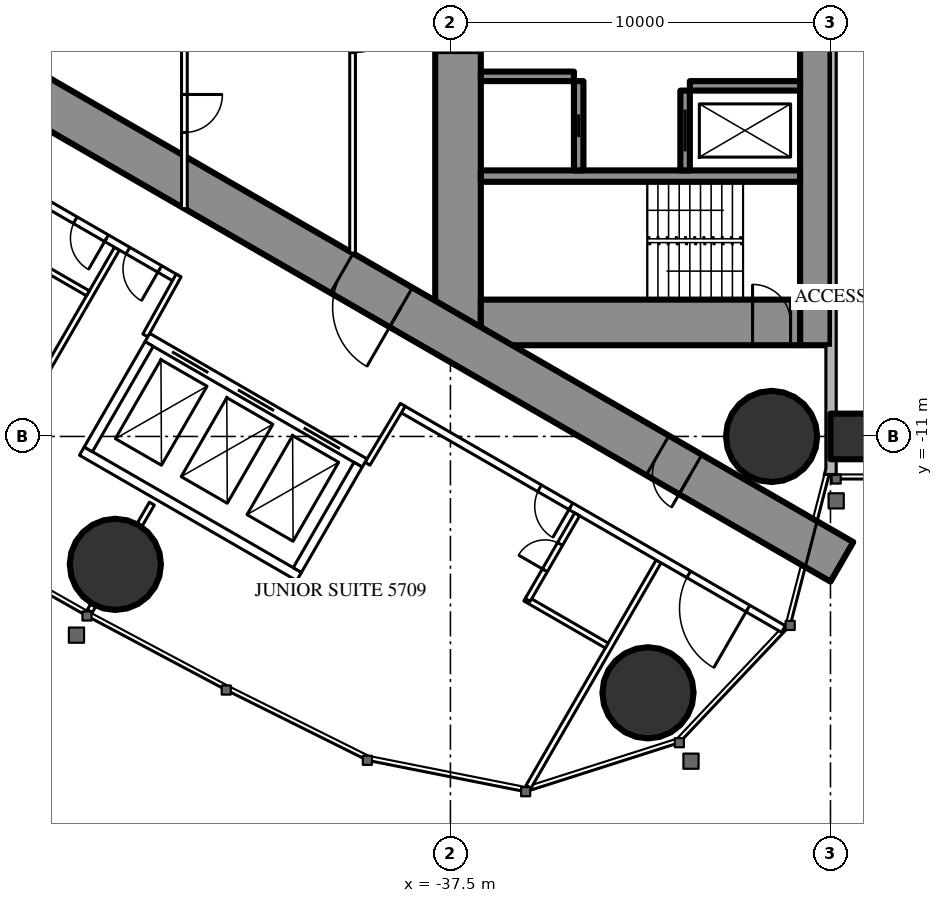
"""IFC4 building model, lengths in metres.
Left out: names, types, materials, properties, quantities, classifications, styles, units other than length and angle.
Written with IfcOpenShell. Run it as: python <this file> out.ifc"""

import sys

from ifc_helpers import new_model, si_unit, direction, frame, frame_2d, origin, origin_2d, place, context, subcontext, project, spatial, rectangle, hollow_rectangle, circle, extrude, element, fill, save


model = new_model("IFC4")
c1 = context("Model", 3, precision=1e-05, world=origin(), true_north=direction((0.0, 1.0)))
c2 = subcontext(c1, "Body", "Model", "MODEL_VIEW")
j1 = project(units=[si_unit("LENGTHUNIT", "METRE"), si_unit("PLANEANGLEUNIT", "RADIAN")], contexts=[c1])
p1 = place(None, origin())
s1 = spatial("IfcSite", under=j1, at=p1, CompositionType="ELEMENT")
p2 = place(p1, origin())
s2 = spatial("IfcBuilding", under=s1, at=p2, CompositionType="ELEMENT")
p3 = place(p2, frame((0.0, 0.0, 215.3)))
s3 = spatial("IfcBuildingStorey", under=s2, at=p3, CompositionType="ELEMENT", Elevation=215.3)
for number, where, z_axis, x_axis in (
    (1, (-32.301, -17.745, 0.0), (0.0, 0.0, 1.0), (1.0, 0.0, 0.0)),
    (2, (-29.05, -11.0, 0.0), (0.0, 0.0, 1.0), (1.0, 0.0, 0.0)),
    (3, (-46.317, -14.365, 0.0), (0.0, 0.0, 1.0), (1.0, 0.0, 0.0)),
):
    element("IfcColumn", number, at=place(p3, frame(where, z_axis=z_axis, x_axis=x_axis)), inside=s3, PredefinedType="COLUMN", context=c2, shape_type="SweptSolid", body=[
        extrude(circle(Radius=1.2, at=origin_2d()), origin(), (0.0, 0.0, 1.0), 3.6),
    ])
p4 = place(p3, frame((-27.9, 8.6, 0.0), z_axis=(0.0, 0.0, 1.0), x_axis=(0.0, -1.0, 0.0)))
e4 = element("IfcWall", 4, at=p4, inside=s3, PredefinedType="SHEAR", context=c2, shape_type="SweptSolid", body=[
    extrude(rectangle(XDim=17.2, YDim=0.8, at=frame_2d((8.6, 0.0))), origin(), (0.0, 0.0, 1.0), 3.6),
])
p5 = place(p4, frame((6.95, 0.0, 0.0)))
e5 = element("IfcOpeningElement", 5, at=p5, cuts=e4, PredefinedType="OPENING", context=c2, shape_type="SweptSolid", body=[
    extrude(rectangle(XDim=0.9, YDim=2.2, at=frame_2d((0.45, 1.1))), frame((0.0, 0.41, 0.0), z_axis=(0.0, -1.0, 0.0), x_axis=(1.0, 0.0, 0.0)), (0.0, 0.0, 1.0), 0.82),
])
p6 = place(p3, frame((-37.3, 8.6, 0.0), z_axis=(0.0, 0.0, 1.0), x_axis=(0.0, -1.0, 0.0)))
e6 = element("IfcWall", 6, at=p6, inside=s3, PredefinedType="SHEAR", context=c2, shape_type="SweptSolid", body=[
    extrude(rectangle(XDim=17.2, YDim=1.2, at=frame_2d((8.6, 0.0))), origin(), (0.0, 0.0, 1.0), 3.6),
])
p7 = place(p6, frame((7.7, 0.0, 0.0)))
e7 = element("IfcOpeningElement", 7, at=p7, cuts=e6, PredefinedType="OPENING", context=c2, shape_type="SweptSolid", body=[
    extrude(rectangle(XDim=1.8, YDim=2.2, at=frame_2d((0.9, 1.1))), frame((0.0, 0.61, 0.0), z_axis=(0.0, -1.0, 0.0), x_axis=(1.0, 0.0, 0.0)), (0.0, 0.0, 1.0), 1.22),
])
p8 = place(p3, frame((-28.3, -8.0, 0.0), z_axis=(0.0, 0.0, 1.0), x_axis=(-1.0, 0.0, 0.0)))
e8 = element("IfcWall", 8, at=p8, inside=s3, PredefinedType="SHEAR", context=c2, shape_type="SweptSolid", body=[
    extrude(rectangle(XDim=8.4, YDim=1.2, at=frame_2d((4.2, 0.0))), origin(), (0.0, 0.0, 1.0), 3.6),
])
p9 = place(p8, frame((0.25, 0.0, 0.0)))
e9 = element("IfcOpeningElement", 9, at=p9, cuts=e8, PredefinedType="OPENING", context=c2, shape_type="SweptSolid", body=[
    extrude(rectangle(XDim=1.0, YDim=2.2, at=frame_2d((0.5, 1.1))), frame((0.0, 0.61, 0.0), z_axis=(0.0, -1.0, 0.0), x_axis=(1.0, 0.0, 0.0)), (0.0, 0.0, 1.0), 1.22),
])
p10 = place(p3, frame((-28.3, -4.15, 0.0), z_axis=(0.0, 0.0, 1.0), x_axis=(-1.0, 0.0, 0.0)))
e10 = element("IfcWall", 10, at=p10, inside=s3, PredefinedType="SHEAR", context=c2, shape_type="SweptSolid", body=[
    extrude(rectangle(XDim=8.4, YDim=0.3, at=frame_2d((4.2, 0.0))), origin(), (0.0, 0.0, 1.0), 3.6),
])
p11 = place(p3, frame((-31.325, -1.9, 0.0), z_axis=(0.0, 0.0, 1.0), x_axis=(0.0, -1.0, 0.0)))
e11 = element("IfcWall", 11, at=p11, inside=s3, PredefinedType="SHEAR", context=c2, shape_type="SweptSolid", body=[
    extrude(rectangle(XDim=2.1, YDim=0.25, at=frame_2d((1.05, 0.0))), origin(), (0.0, 0.0, 1.0), 3.6),
])
p12 = place(p11, frame((0.5, 0.0, 0.0)))
e12 = element("IfcOpeningElement", 12, at=p12, cuts=e11, PredefinedType="OPENING", context=c2, shape_type="SweptSolid", body=[
    extrude(rectangle(XDim=1.1, YDim=2.2, at=frame_2d((0.55, 1.1))), frame((0.0, 0.135, 0.0), z_axis=(0.0, -1.0, 0.0), x_axis=(1.0, 0.0, 0.0)), (0.0, 0.0, 1.0), 0.27),
])
p13 = place(p3, frame((-34.125, -1.65, 0.0), z_axis=(0.0, 0.0, 1.0), x_axis=(0.0, -1.0, 0.0)))
e13 = element("IfcWall", 13, at=p13, inside=s3, PredefinedType="SHEAR", context=c2, shape_type="SweptSolid", body=[
    extrude(rectangle(XDim=2.35, YDim=0.25, at=frame_2d((1.175, 0.0))), origin(), (0.0, 0.0, 1.0), 3.6),
])
p14 = place(p13, frame((0.875, 0.0, 0.0)))
e14 = element("IfcOpeningElement", 14, at=p14, cuts=e13, PredefinedType="OPENING", context=c2, shape_type="SweptSolid", body=[
    extrude(rectangle(XDim=0.6, YDim=2.0, at=frame_2d((0.3, 1.0))), frame((0.0, 0.135, 0.0), z_axis=(0.0, -1.0, 0.0), x_axis=(1.0, 0.0, 0.0)), (0.0, 0.0, 1.0), 0.27),
])
p15 = place(p3, frame((-28.3, -1.775, 0.0), z_axis=(0.0, 0.0, 1.0), x_axis=(-1.0, 0.0, 0.0)))
e15 = element("IfcWall", 15, at=p15, inside=s3, PredefinedType="SHEAR", context=c2, shape_type="SweptSolid", body=[
    extrude(rectangle(XDim=2.9, YDim=0.25, at=frame_2d((1.45, 0.0))), origin(), (0.0, 0.0, 1.0), 3.6),
])
p16 = place(p3, frame((-34.25, -1.525, 0.0), z_axis=(0.0, 0.0, 1.0), x_axis=(-1.0, 0.0, 0.0)))
e16 = element("IfcWall", 16, at=p16, inside=s3, PredefinedType="SHEAR", context=c2, shape_type="SweptSolid", body=[
    extrude(rectangle(XDim=2.45, YDim=0.25, at=frame_2d((1.225, 0.0))), origin(), (0.0, 0.0, 1.0), 3.6),
])
p17 = place(p3, frame((-27.2, -14.3, 0.0), z_axis=(0.0, 0.0, 1.0), x_axis=(-0.866024021859, 0.500002393557, 0.0)))
e17 = element("IfcWall", 17, at=p17, inside=s3, PredefinedType="SHEAR", context=c2, shape_type="SweptSolid", body=[
    extrude(rectangle(XDim=27.907, YDim=1.2, at=frame_2d((13.954, 0.0))), origin(), (0.0, 0.0, 1.0), 3.6),
])
p18 = place(p17, frame((4.6, 0.0, 0.0)))
e18 = element("IfcOpeningElement", 18, at=p18, cuts=e17, PredefinedType="OPENING", context=c2, shape_type="SweptSolid", body=[
    extrude(rectangle(XDim=1.0, YDim=2.2, at=frame_2d((0.5, 1.1))), frame((0.0, 0.61, 0.0), z_axis=(0.0, -1.0, 0.0), x_axis=(1.0, 0.0, 0.0)), (0.0, 0.0, 1.0), 1.22),
])
p19 = place(p17, frame((13.395, 0.0, 0.0)))
e19 = element("IfcOpeningElement", 19, at=p19, cuts=e17, PredefinedType="OPENING", context=c2, shape_type="SweptSolid", body=[
    extrude(rectangle(XDim=1.8, YDim=2.2, at=frame_2d((0.9, 1.1))), frame((0.0, 0.61, 0.0), z_axis=(0.0, -1.0, 0.0), x_axis=(1.0, 0.0, 0.0)), (0.0, 0.0, 1.0), 1.22),
])
p20 = place(p3, frame((-26.9, -11.0, 0.0), z_axis=(0.0, 0.0, 1.0), x_axis=(1.0, 0.0, 0.0)))
e20 = element("IfcColumn", 20, at=p20, inside=s3, PredefinedType="COLUMN", context=c2, shape_type="SweptSolid", body=[
    extrude(hollow_rectangle(XDim=1.2, YDim=1.2, WallThickness=0.12, at=origin_2d()), origin(), (0.0, 0.0, 1.0), 3.6),
])
p21 = place(p3, frame((-32.022, -14.287, 0.0), z_axis=(0.0, 0.0, 1.0), x_axis=(-0.50000019414, -0.866025291697, 0.0)))
e21 = element("IfcWall", 21, at=p21, inside=s3, PredefinedType="PARTITIONING", context=c2, shape_type="SweptSolid", body=[
    extrude(rectangle(XDim=6.848, YDim=0.15, at=frame_2d((3.424, 0.0))), origin(), (0.0, 0.0, 1.0), 3.35),
])
p22 = place(p3, frame((-46.898, -15.439, 0.0), z_axis=(0.0, 0.0, 1.0), x_axis=(-0.500232303069, -0.865891241997, 0.0)))
e22 = element("IfcWall", 22, at=p22, inside=s3, PredefinedType="PARTITIONING", context=c2, shape_type="SweptSolid", body=[
    extrude(rectangle(XDim=0.18, YDim=0.15, at=frame_2d((0.09, 0.0))), origin(), (0.0, 0.0, 1.0), 2.45),
])
p23 = place(p3, frame((-46.274, -6.059, 0.0), z_axis=(0.0, 0.0, 1.0), x_axis=(-0.500020471368, -0.866013584312, 0.0)))
e23 = element("IfcWall", 23, at=p23, inside=s3, PredefinedType="PARTITIONING", context=c2, shape_type="SweptSolid", body=[
    extrude(rectangle(XDim=6.028, YDim=0.15, at=frame_2d((3.014, 0.0))), origin(), (0.0, 0.0, 1.0), 2.45),
])
p24 = place(p3, frame((-45.356, -12.767, 0.0), z_axis=(0.0, 0.0, 1.0), x_axis=(-0.499886366516, -0.866091000168, 0.0)))
e24 = element("IfcWall", 24, at=p24, inside=s3, PredefinedType="PARTITIONING", context=c2, shape_type="SweptSolid", body=[
    extrude(rectangle(XDim=0.645, YDim=0.15, at=frame_2d((0.322, 0.0))), origin(), (0.0, 0.0, 1.0), 3.35),
])
p25 = place(p3, frame((-28.737, -16.068, 0.0), z_axis=(0.0, 0.0, 1.0), x_axis=(-0.866029399323, 0.49999307946, 0.0)))
e25 = element("IfcWall", 25, at=p25, inside=s3, PredefinedType="PARTITIONING", context=c2, shape_type="SweptSolid", body=[
    extrude(rectangle(XDim=11.61, YDim=0.2, at=frame_2d((5.805, 0.0))), origin(), (0.0, 0.0, 1.0), 3.35),
])
p26 = place(p25, frame((1.08, 0.0, 0.0)))
e26 = element("IfcOpeningElement", 26, at=p26, cuts=e25, PredefinedType="OPENING", context=c2, shape_type="SweptSolid", body=[
    extrude(rectangle(XDim=1.8, YDim=2.03, at=frame_2d((0.9, 1.015))), frame((0.0, 0.11, 0.0), z_axis=(0.0, -1.0, 0.0), x_axis=(1.0, 0.0, 0.0)), (0.0, 0.0, 1.0), 0.22),
])
p27 = place(p25, frame((6.46, 0.0, 0.0)))
e27 = element("IfcOpeningElement", 27, at=p27, cuts=e25, PredefinedType="OPENING", context=c2, shape_type="SweptSolid", body=[
    extrude(rectangle(XDim=0.95, YDim=2.2, at=frame_2d((0.475, 1.1))), frame((0.0, 0.11, 0.0), z_axis=(0.0, -1.0, 0.0), x_axis=(1.0, 0.0, 0.0)), (0.0, 0.0, 1.0), 0.22),
])
p28 = place(p3, frame((-44.715, -6.844, 0.0), z_axis=(0.0, 0.0, 1.0), x_axis=(-0.866025261224, 0.500000246922, 0.0)))
e28 = element("IfcWall", 28, at=p28, inside=s3, PredefinedType="PARTITIONING", context=c2, shape_type="SweptSolid", body=[
    extrude(rectangle(XDim=13.567, YDim=0.2, at=frame_2d((6.783, 0.0))), origin(), (0.0, 0.0, 1.0), 3.35),
])
p29 = place(p28, frame((9.667, 0.0, 0.0)))
e29 = element("IfcOpeningElement", 29, at=p29, cuts=e28, PredefinedType="OPENING", context=c2, shape_type="SweptSolid", body=[
    extrude(rectangle(XDim=0.95, YDim=2.2, at=frame_2d((0.475, 1.1))), frame((0.0, 0.11, 0.0), z_axis=(0.0, -1.0, 0.0), x_axis=(1.0, 0.0, 0.0)), (0.0, 0.0, 1.0), 0.22),
])
p30 = place(p28, frame((2.117, 0.0, 0.0)))
e30 = element("IfcOpeningElement", 30, at=p30, cuts=e28, PredefinedType="OPENING", context=c2, shape_type="SweptSolid", body=[
    extrude(rectangle(XDim=0.95, YDim=2.2, at=frame_2d((0.475, 1.1))), frame((0.0, 0.11, 0.0), z_axis=(0.0, -1.0, 0.0), x_axis=(1.0, 0.0, 0.0)), (0.0, 0.0, 1.0), 0.22),
])
p31 = place(p28, frame((0.5, 0.0, 0.0)))
e31 = element("IfcOpeningElement", 31, at=p31, cuts=e28, PredefinedType="OPENING", context=c2, shape_type="SweptSolid", body=[
    extrude(rectangle(XDim=0.967, YDim=2.2, at=frame_2d((0.483, 1.1))), frame((0.0, 0.11, 0.0), z_axis=(0.0, -1.0, 0.0), x_axis=(1.0, 0.0, 0.0)), (0.0, 0.0, 1.0), 0.22),
])
for number, where, z_axis, x_axis in (
    (32, (-39.683, -11.718, 0.0), (0.0, 0.0, 1.0), (0.514, 0.858, 0.0)),
    (33, (-44.652, -6.764, 0.0), (0.0, 0.0, 1.0), (-0.485, -0.874, 0.0)),
):
    element("IfcWall", number, at=place(p3, frame(where, z_axis=z_axis, x_axis=x_axis)), inside=s3, PredefinedType="PARTITIONING", context=c2, shape_type="SweptSolid", body=[
        extrude(rectangle(XDim=1.805, YDim=0.15, at=frame_2d((0.903, 0.0))), origin(), (0.0, 0.0, 1.0), 3.35),
    ])
p32 = place(p3, frame((-47.039, -7.234, 0.0), z_axis=(0.0, 0.0, 1.0), x_axis=(-0.866073894602, 0.499916002032, 0.0)))
e34 = element("IfcWall", 34, at=p32, inside=s3, PredefinedType="PARTITIONING", context=c2, shape_type="SweptSolid", body=[
    extrude(rectangle(XDim=2.475, YDim=0.15, at=frame_2d((1.238, 0.0))), origin(), (0.0, 0.0, 1.0), 2.5),
])
p33 = place(p3, frame((-33.387, -16.502, 0.0), z_axis=(0.0, 0.0, 1.0), x_axis=(-0.866006523861, 0.500032699561, 0.0)))
e35 = element("IfcWall", 35, at=p33, inside=s3, PredefinedType="PARTITIONING", context=c2, shape_type="SweptSolid", body=[
    extrude(rectangle(XDim=2.475, YDim=0.15, at=frame_2d((1.237, 0.0))), origin(), (0.0, 0.0, 1.0), 3.35),
])
p34 = place(p3, frame((-34.165, -13.05, 0.0), z_axis=(0.0, 0.0, 1.0), x_axis=(-0.500047596559, -0.865997922154, 0.0)))
e36 = element("IfcWall", 36, at=p34, inside=s3, PredefinedType="PARTITIONING", context=c2, shape_type="SweptSolid", body=[
    extrude(rectangle(XDim=2.6, YDim=0.15, at=frame_2d((1.3, 0.0))), origin(), (0.0, 0.0, 1.0), 3.35),
])
p35 = place(p34, frame((0.9, 0.0, 0.0)))
e37 = element("IfcOpeningElement", 37, at=p35, cuts=e36, PredefinedType="OPENING", context=c2, shape_type="SweptSolid", body=[
    extrude(rectangle(XDim=0.8, YDim=2.2, at=frame_2d((0.4, 1.1))), frame((0.0, 0.085, 0.0), z_axis=(0.0, -1.0, 0.0), x_axis=(1.0, 0.0, 0.0)), (0.0, 0.0, 1.0), 0.17),
])
p36 = place(p3, frame((-40.075, 6.174, 0.0), z_axis=(0.0, 0.0, 1.0), x_axis=(0.0, -1.0, 0.0)))
e38 = element("IfcWall", 38, at=p36, inside=s3, PredefinedType="PARTITIONING", context=c2, shape_type="SweptSolid", body=[
    extrude(rectangle(XDim=12.348, YDim=0.15, at=frame_2d((6.174, 0.0))), origin(), (0.0, 0.0, 1.0), 3.35),
])
p37 = place(p36, frame((5.274, 0.0, 0.0)))
e39 = element("IfcOpeningElement", 39, at=p37, cuts=e38, PredefinedType="OPENING", context=c2, shape_type="SweptSolid", body=[
    extrude(rectangle(XDim=1.8, YDim=2.2, at=frame_2d((0.9, 1.1))), frame((0.0, 0.085, 0.0), z_axis=(0.0, -1.0, 0.0), x_axis=(1.0, 0.0, 0.0)), (0.0, 0.0, 1.0), 0.17),
])
p38 = place(p3, frame((-44.5, 5.005, 0.0), z_axis=(0.0, 0.0, 1.0), x_axis=(0.0, -1.0, 0.0)))
e40 = element("IfcWall", 40, at=p38, inside=s3, PredefinedType="PARTITIONING", context=c2, shape_type="SweptSolid", body=[
    extrude(rectangle(XDim=10.009, YDim=0.15, at=frame_2d((5.005, 0.0))), origin(), (0.0, 0.0, 1.0), 2.5),
])
p39 = place(p38, frame((2.002, 0.0, 0.0)))
e41 = element("IfcOpeningElement", 41, at=p39, cuts=e40, PredefinedType="OPENING", context=c2, shape_type="SweptSolid", body=[
    extrude(rectangle(XDim=1.0, YDim=2.2, at=frame_2d((0.5, 1.1))), frame((0.0, 0.085, 0.0), z_axis=(0.0, -1.0, 0.0), x_axis=(1.0, 0.0, 0.0)), (0.0, 0.0, 1.0), 0.17),
])
p40 = place(p38, frame((7.007, 0.0, 0.0)))
e42 = element("IfcOpeningElement", 42, at=p40, cuts=e40, PredefinedType="OPENING", context=c2, shape_type="SweptSolid", body=[
    extrude(rectangle(XDim=1.0, YDim=2.2, at=frame_2d((0.5, 1.1))), frame((0.0, 0.085, 0.0), z_axis=(0.0, -1.0, 0.0), x_axis=(1.0, 0.0, 0.0)), (0.0, 0.0, 1.0), 0.17),
])
p41 = place(p3, frame((-39.758, -11.697, 0.0), z_axis=(0.0, 0.0, 1.0), x_axis=(-0.866024194504, 0.500002094529, 0.0)))
e43 = element("IfcWall", 43, at=p41, inside=s3, PredefinedType="PARTITIONING", context=c2, shape_type="SweptSolid", body=[
    extrude(rectangle(XDim=6.6, YDim=0.25, at=frame_2d((3.3, 0.0))), origin(), (0.0, 0.0, 1.0), 3.35),
])
p42 = place(p41, frame((0.75, 0.0, 0.0)))
e44 = element("IfcOpeningElement", 44, at=p42, cuts=e43, PredefinedType="OPENING", context=c2, shape_type="SweptSolid", body=[
    extrude(rectangle(XDim=1.1, YDim=2.2, at=frame_2d((0.55, 1.1))), frame((0.0, 0.135, 0.0), z_axis=(0.0, -1.0, 0.0), x_axis=(1.0, 0.0, 0.0)), (0.0, 0.0, 1.0), 0.27),
])
p43 = place(p41, frame((2.75, 0.0, 0.0)))
e45 = element("IfcOpeningElement", 45, at=p43, cuts=e43, PredefinedType="OPENING", context=c2, shape_type="SweptSolid", body=[
    extrude(rectangle(XDim=1.1, YDim=2.2, at=frame_2d((0.55, 1.1))), frame((0.0, 0.135, 0.0), z_axis=(0.0, -1.0, 0.0), x_axis=(1.0, 0.0, 0.0)), (0.0, 0.0, 1.0), 0.27),
])
p44 = place(p41, frame((4.75, 0.0, 0.0)))
e46 = element("IfcOpeningElement", 46, at=p44, cuts=e43, PredefinedType="OPENING", context=c2, shape_type="SweptSolid", body=[
    extrude(rectangle(XDim=1.1, YDim=2.2, at=frame_2d((0.55, 1.1))), frame((0.0, 0.135, 0.0), z_axis=(0.0, -1.0, 0.0), x_axis=(1.0, 0.0, 0.0)), (0.0, 0.0, 1.0), 0.27),
])
p45 = place(p3, frame((-41.482, -14.686, 0.0), z_axis=(0.0, 0.0, 1.0), x_axis=(-0.86603344179, 0.499986077507, 0.0)))
e47 = element("IfcWall", 47, at=p45, inside=s3, PredefinedType="PARTITIONING", context=c2, shape_type="SweptSolid", body=[
    extrude(rectangle(XDim=6.6, YDim=0.25, at=frame_2d((3.3, 0.0))), origin(), (0.0, 0.0, 1.0), 3.35),
])
for number, where, z_axis, x_axis in (
    (48, (-39.928, -11.743, 0.0), (0.0, 0.0, 1.0), (-0.5, -0.866, 0.0)),
    (49, (-45.428, -8.568, 0.0), (0.0, 0.0, 1.0), (-0.5, -0.866, 0.0)),
):
    element("IfcWall", number, at=place(p3, frame(where, z_axis=z_axis, x_axis=x_axis)), inside=s3, PredefinedType="PARTITIONING", context=c2, shape_type="SweptSolid", body=[
        extrude(rectangle(XDim=3.201, YDim=0.25, at=frame_2d((1.6, 0.0))), origin(), (0.0, 0.0, 1.0), 3.35),
    ])
p46 = place(p30, origin())
e50 = element("IfcDoor", 50, at=p46, inside=s3, OperationType="SINGLE_SWING_LEFT", PredefinedType="DOOR", context=c2, shape_type="SweptSolid", body=[
    extrude(rectangle(XDim=0.95, YDim=2.2, at=frame_2d((0.475, 1.1))), frame((0.0, 0.025, 0.0), z_axis=(0.0, -1.0, 0.0), x_axis=(1.0, 0.0, 0.0)), (0.0, 0.0, 1.0), 0.05),
])
fill(e30, e50)
p47 = place(p26, origin())
e51 = element("IfcDoor", 51, at=p47, inside=s3, OperationType="DOUBLE_DOOR_SINGLE_SWING", PredefinedType="DOOR", context=c2, shape_type="SweptSolid", body=[
    extrude(rectangle(XDim=1.8, YDim=2.03, at=frame_2d((0.9, 1.015))), frame((0.0, 0.025, 0.0), z_axis=(0.0, -1.0, 0.0), x_axis=(1.0, 0.0, 0.0)), (0.0, 0.0, 1.0), 0.05),
])
fill(e26, e51)
p48 = place(p35, origin())
e52 = element("IfcDoor", 52, at=p48, inside=s3, OperationType="SINGLE_SWING_RIGHT", PredefinedType="DOOR", context=c2, shape_type="SweptSolid", body=[
    extrude(rectangle(XDim=0.8, YDim=2.2, at=frame_2d((0.4, 1.1))), frame((0.0, 0.025, 0.0), z_axis=(0.0, -1.0, 0.0), x_axis=(1.0, 0.0, 0.0)), (0.0, 0.0, 1.0), 0.05),
])
fill(e37, e52)
p49 = place(p27, origin())
e53 = element("IfcDoor", 53, at=p49, inside=s3, OperationType="SINGLE_SWING_LEFT", PredefinedType="DOOR", context=c2, shape_type="SweptSolid", body=[
    extrude(rectangle(XDim=0.95, YDim=2.2, at=frame_2d((0.475, 1.1))), frame((0.0, 0.025, 0.0), z_axis=(0.0, -1.0, 0.0), x_axis=(1.0, 0.0, 0.0)), (0.0, 0.0, 1.0), 0.05),
])
fill(e27, e53)
p50 = place(p31, origin())
e54 = element("IfcDoor", 54, at=p50, inside=s3, OperationType="SINGLE_SWING_LEFT", PredefinedType="DOOR", context=c2, shape_type="SweptSolid", body=[
    extrude(rectangle(XDim=0.967, YDim=2.2, at=frame_2d((0.483, 1.1))), frame((0.0, 0.025, 0.0), z_axis=(0.0, -1.0, 0.0), x_axis=(1.0, 0.0, 0.0)), (0.0, 0.0, 1.0), 0.05),
])
fill(e31, e54)
p51 = place(p40, origin())
e55 = element("IfcDoor", 55, at=p51, inside=s3, OperationType="SINGLE_SWING_LEFT", PredefinedType="DOOR", context=c2, shape_type="SweptSolid", body=[
    extrude(rectangle(XDim=1.0, YDim=2.2, at=frame_2d((0.5, 1.1))), frame((0.0, 0.025, 0.0), z_axis=(0.0, -1.0, 0.0), x_axis=(1.0, 0.0, 0.0)), (0.0, 0.0, 1.0), 0.05),
])
fill(e42, e55)
p52 = place(p18, origin())
e56 = element("IfcDoor", 56, at=p52, inside=s3, OperationType="SINGLE_SWING_LEFT", PredefinedType="DOOR", context=c2, shape_type="SweptSolid", body=[
    extrude(rectangle(XDim=1.0, YDim=2.2, at=frame_2d((0.5, 1.1))), frame((0.0, 0.025, 0.0), z_axis=(0.0, -1.0, 0.0), x_axis=(1.0, 0.0, 0.0)), (0.0, 0.0, 1.0), 0.05),
])
fill(e18, e56)
p53 = place(p19, origin())
e57 = element("IfcDoor", 57, at=p53, inside=s3, OperationType="DOUBLE_DOOR_SINGLE_SWING", PredefinedType="DOOR", context=c2, shape_type="SweptSolid", body=[
    extrude(rectangle(XDim=1.8, YDim=2.2, at=frame_2d((0.9, 1.1))), frame((0.0, 0.025, 0.0), z_axis=(0.0, -1.0, 0.0), x_axis=(1.0, 0.0, 0.0)), (0.0, 0.0, 1.0), 0.05),
])
fill(e19, e57)
p54 = place(p9, origin())
e58 = element("IfcDoor", 58, at=p54, inside=s3, OperationType="SINGLE_SWING_RIGHT", PredefinedType="DOOR", context=c2, shape_type="SweptSolid", body=[
    extrude(rectangle(XDim=1.0, YDim=2.2, at=frame_2d((0.5, 1.1))), frame((0.0, 0.025, 0.0), z_axis=(0.0, -1.0, 0.0), x_axis=(1.0, 0.0, 0.0)), (0.0, 0.0, 1.0), 0.05),
])
fill(e9, e58)
p55 = place(p12, origin())
e59 = element("IfcDoor", 59, at=p55, inside=s3, OperationType="SLIDING_TO_LEFT", PredefinedType="USERDEFINED", context=c2, shape_type="SweptSolid", body=[
    extrude(rectangle(XDim=1.1, YDim=2.2, at=frame_2d((0.55, 1.1))), frame((0.0, 0.025, 0.0), z_axis=(0.0, -1.0, 0.0), x_axis=(1.0, 0.0, 0.0)), (0.0, 0.0, 1.0), 0.05),
])
fill(e12, e59)
p56 = place(p14, origin())
e60 = element("IfcDoor", 60, at=p56, inside=s3, OperationType="SLIDING_TO_LEFT", PredefinedType="DOOR", context=c2, shape_type="SweptSolid", body=[
    extrude(rectangle(XDim=0.6, YDim=2.0, at=frame_2d((0.3, 1.0))), frame((0.0, 0.025, 0.0), z_axis=(0.0, -1.0, 0.0), x_axis=(1.0, 0.0, 0.0)), (0.0, 0.0, 1.0), 0.05),
])
fill(e14, e60)
p57 = place(p42, origin())
e61 = element("IfcDoor", 61, at=p57, inside=s3, OperationType="DOUBLE_DOOR_SLIDING", PredefinedType="USERDEFINED", context=c2, shape_type="SweptSolid", body=[
    extrude(rectangle(XDim=1.1, YDim=2.2, at=frame_2d((0.55, 1.1))), frame((0.0, 0.025, 0.0), z_axis=(0.0, -1.0, 0.0), x_axis=(1.0, 0.0, 0.0)), (0.0, 0.0, 1.0), 0.05),
])
fill(e44, e61)
p58 = place(p43, origin())
e62 = element("IfcDoor", 62, at=p58, inside=s3, OperationType="DOUBLE_DOOR_SLIDING", PredefinedType="USERDEFINED", context=c2, shape_type="SweptSolid", body=[
    extrude(rectangle(XDim=1.1, YDim=2.2, at=frame_2d((0.55, 1.1))), frame((0.0, 0.025, 0.0), z_axis=(0.0, -1.0, 0.0), x_axis=(1.0, 0.0, 0.0)), (0.0, 0.0, 1.0), 0.05),
])
fill(e45, e62)
p59 = place(p44, origin())
e63 = element("IfcDoor", 63, at=p59, inside=s3, OperationType="DOUBLE_DOOR_SLIDING", PredefinedType="USERDEFINED", context=c2, shape_type="SweptSolid", body=[
    extrude(rectangle(XDim=1.1, YDim=2.2, at=frame_2d((0.55, 1.1))), frame((0.0, 0.025, 0.0), z_axis=(0.0, -1.0, 0.0), x_axis=(1.0, 0.0, 0.0)), (0.0, 0.0, 1.0), 0.05),
])
fill(e46, e63)
save(model, sys.argv[1])
